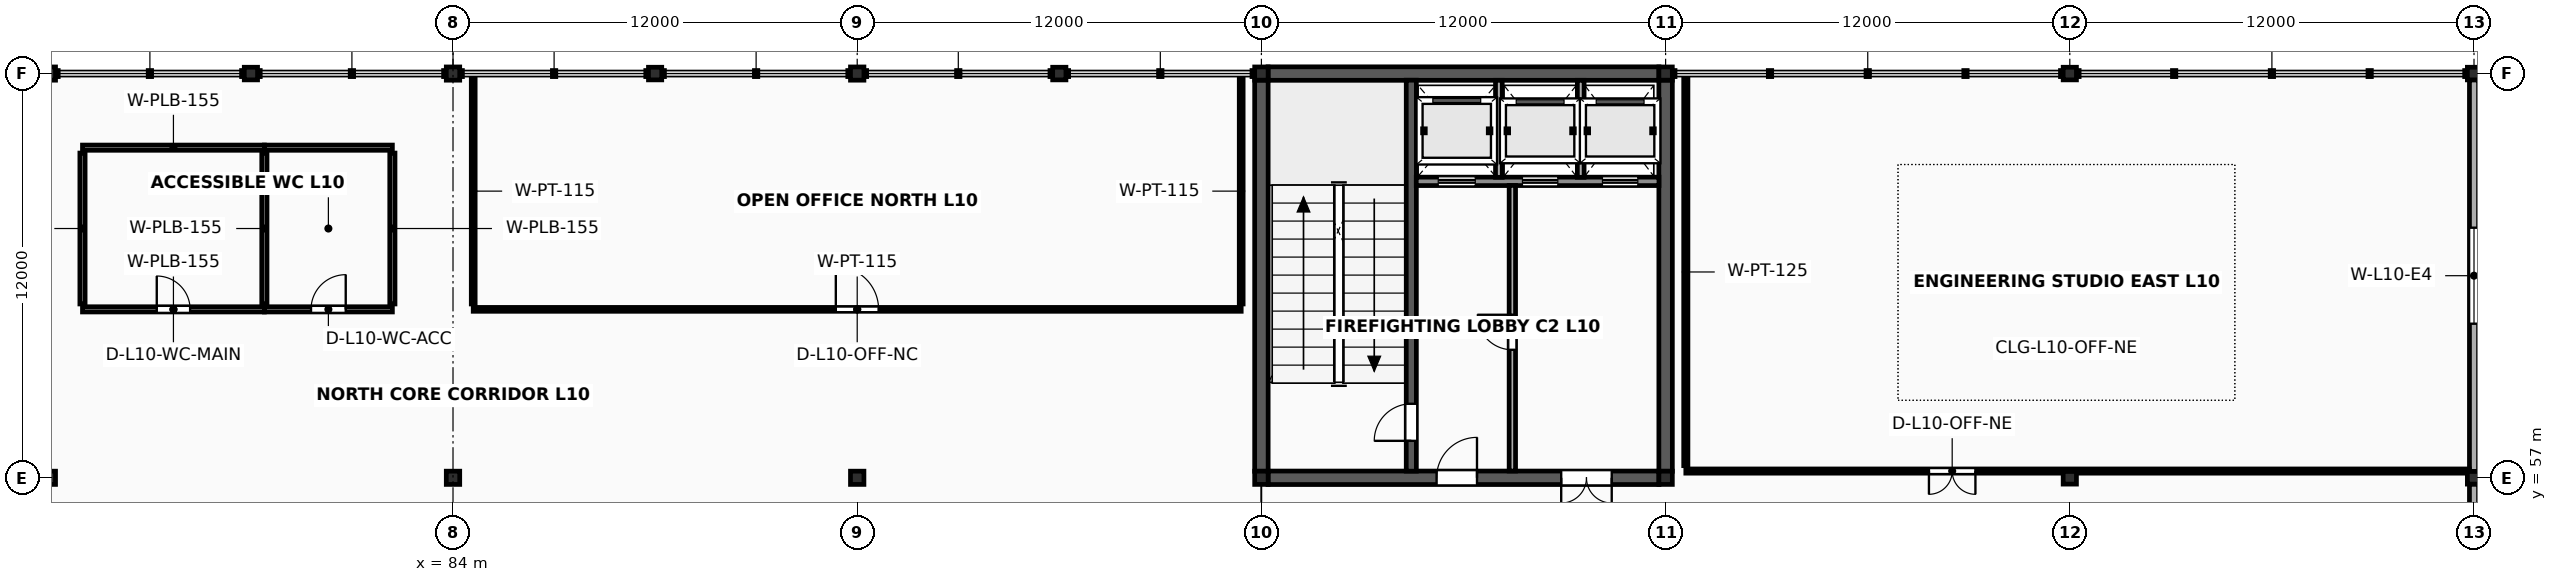
"""IFC4 building model, lengths in metres.
Left out: names, types, materials, properties, quantities, classifications, styles, units other than length and angle.
Written with IfcOpenShell. Run it as: python <this file> out.ifc"""

import sys

from ifc_helpers import new_model, si_unit, direction, frame, frame_2d, origin, origin_2d, place, context, subcontext, project, spatial, rectangle, i_section, extrude, element, fill, save


model = new_model("IFC4")
c1 = context("Model", 3, precision=1e-05, world=origin(), true_north=direction((0.0, 1.0)))
c2 = subcontext(c1, "Body", "Model", "MODEL_VIEW")
j1 = project(units=[si_unit("LENGTHUNIT", "METRE"), si_unit("PLANEANGLEUNIT", "RADIAN")], contexts=[c1])
p1 = place(None, origin())
s1 = spatial("IfcSite", under=j1, at=p1, CompositionType="ELEMENT")
p2 = place(p1, origin())
s2 = spatial("IfcBuilding", under=s1, at=p2, CompositionType="ELEMENT")
p3 = place(p2, frame((0.0, 0.0, 41.6)))
s3 = spatial("IfcBuildingStorey", under=s2, at=p3, CompositionType="ELEMENT", Elevation=41.6)
for number, where, z_axis, x_axis in (
    (1, (72.0, 57.0, 0.0), (0.0, 0.0, 1.0), (1.0, 0.0, 0.0)),
    (2, (72.0, 69.0, 0.0), (0.0, 0.0, 1.0), (1.0, 0.0, 0.0)),
    (3, (84.0, 57.0, 0.0), (0.0, 0.0, 1.0), (1.0, 0.0, 0.0)),
    (4, (84.0, 69.0, 0.0), (0.0, 0.0, 1.0), (1.0, 0.0, 0.0)),
    (5, (96.0, 57.0, 0.0), (0.0, 0.0, 1.0), (1.0, 0.0, 0.0)),
    (6, (96.0, 69.0, 0.0), (0.0, 0.0, 1.0), (1.0, 0.0, 0.0)),
    (7, (108.0, 57.0, 0.0), (0.0, 0.0, 1.0), (1.0, 0.0, 0.0)),
    (8, (108.0, 69.0, 0.0), (0.0, 0.0, 1.0), (1.0, 0.0, 0.0)),
    (9, (120.0, 57.0, 0.0), (0.0, 0.0, 1.0), (1.0, 0.0, 0.0)),
    (10, (120.0, 69.0, 0.0), (0.0, 0.0, 1.0), (1.0, 0.0, 0.0)),
):
    element("IfcColumn", number, at=place(p3, frame(where, z_axis=z_axis, x_axis=x_axis)), inside=s3, PredefinedType="COLUMN", context=c2, shape_type="SweptSolid", body=[
        extrude(i_section(OverallWidth=0.399, OverallDepth=0.393, WebThickness=0.023, FlangeThickness=0.037, FilletRadius=0.018, at=origin_2d()), origin(), (0.0, 0.0, 1.0), 4.0),
    ])
for number, where, z_axis, x_axis in (
    (11, (132.0, 57.0, 0.0), (0.0, 0.0, 1.0), (1.0, 0.0, 0.0)),
    (12, (132.0, 69.0, 0.0), (0.0, 0.0, 1.0), (1.0, 0.0, 0.0)),
    (13, (144.0, 57.0, 0.0), (0.0, 0.0, 1.0), (1.0, 0.0, 0.0)),
    (14, (144.0, 69.0, 0.0), (0.0, 0.0, 1.0), (1.0, 0.0, 0.0)),
    (15, (78.0, 69.0, 0.0), (0.0, 0.0, 1.0), (1.0, 0.0, 0.0)),
    (16, (90.0, 69.0, 0.0), (0.0, 0.0, 1.0), (1.0, 0.0, 0.0)),
    (17, (102.0, 69.0, 0.0), (0.0, 0.0, 1.0), (1.0, 0.0, 0.0)),
):
    element("IfcColumn", number, at=place(p3, frame(where, z_axis=z_axis, x_axis=x_axis)), inside=s3, PredefinedType="COLUMN", context=c2, shape_type="SweptSolid", body=[
        extrude(i_section(OverallWidth=0.394, OverallDepth=0.375, WebThickness=0.017, FlangeThickness=0.028, FilletRadius=0.018, at=origin_2d()), origin(), (0.0, 0.0, 1.0), 4.0),
    ])
p4 = place(p3, frame((108.197, 57.0, 0.0), z_axis=(0.0, 0.0, 1.0), x_axis=(1.0, 0.0, 0.0)))
e18 = element("IfcWall", 18, at=p4, inside=s3, PredefinedType="SHEAR", context=c2, shape_type="SweptSolid", body=[
    extrude(rectangle(XDim=11.607, YDim=0.4, at=frame_2d((5.803, 0.0))), origin(), (0.0, 0.0, 1.0), 3.828),
])
p5 = place(p4, frame((5.004, 0.0, 0.0)))
e19 = element("IfcOpeningElement", 19, at=p5, cuts=e18, PredefinedType="OPENING", context=c2, shape_type="SweptSolid", body=[
    extrude(rectangle(XDim=1.2, YDim=2.2, at=frame_2d((0.6, 1.1))), frame((0.0, 0.215, 0.0), z_axis=(0.0, -1.0, 0.0), x_axis=(1.0, 0.0, 0.0)), (0.0, 0.0, 1.0), 0.43),
])
p6 = place(p4, frame((8.704, 0.0, 0.0)))
e20 = element("IfcOpeningElement", 20, at=p6, cuts=e18, PredefinedType="OPENING", context=c2, shape_type="SweptSolid", body=[
    extrude(rectangle(XDim=1.5, YDim=2.25, at=frame_2d((0.75, 1.125))), frame((0.0, 0.215, 0.0), z_axis=(0.0, -1.0, 0.0), x_axis=(1.0, 0.0, 0.0)), (0.0, 0.0, 1.0), 0.43),
])
p7 = place(p3, frame((108.197, 69.0, 0.0), z_axis=(0.0, 0.0, 1.0), x_axis=(1.0, 0.0, 0.0)))
e21 = element("IfcWall", 21, at=p7, inside=s3, PredefinedType="SHEAR", context=c2, shape_type="SweptSolid", body=[
    extrude(rectangle(XDim=11.607, YDim=0.4, at=frame_2d((5.803, 0.0))), origin(), (0.0, 0.0, 1.0), 3.828),
])
for number, where, z_axis, x_axis in (
    (22, (108.0, 57.194, 0.0), (0.0, 0.0, 1.0), (0.0, 1.0, 0.0)),
    (23, (120.0, 57.194, 0.0), (0.0, 0.0, 1.0), (0.0, 1.0, 0.0)),
):
    element("IfcWall", number, at=place(p3, frame(where, z_axis=z_axis, x_axis=x_axis)), inside=s3, PredefinedType="SHEAR", context=c2, shape_type="SweptSolid", body=[
        extrude(rectangle(XDim=11.613, YDim=0.4, at=frame_2d((5.806, 0.0))), origin(), (0.0, 0.0, 1.0), 3.828),
    ])
p8 = place(p3, frame((112.45, 57.197, 0.0), z_axis=(0.0, 0.0, 1.0), x_axis=(0.0, 1.0, 0.0)))
e24 = element("IfcWall", 24, at=p8, inside=s3, PredefinedType="SHEAR", context=c2, shape_type="SweptSolid", body=[
    extrude(rectangle(XDim=11.606, YDim=0.3, at=frame_2d((5.803, 0.0))), origin(), (0.0, 0.0, 1.0), 3.828),
])
p9 = place(p8, frame((0.9, 0.0, 0.0)))
e25 = element("IfcOpeningElement", 25, at=p9, cuts=e24, PredefinedType="OPENING", context=c2, shape_type="SweptSolid", body=[
    extrude(rectangle(XDim=1.1, YDim=2.2, at=frame_2d((0.55, 1.1))), frame((0.0, 0.165, 0.0), z_axis=(0.0, -1.0, 0.0), x_axis=(1.0, 0.0, 0.0)), (0.0, 0.0, 1.0), 0.33),
])
p10 = place(p3, frame((112.597, 65.8, 0.0), z_axis=(0.0, 0.0, 1.0), x_axis=(1.0, 0.0, 0.0)))
e26 = element("IfcWall", 26, at=p10, inside=s3, PredefinedType="SOLIDWALL", context=c2, shape_type="SweptSolid", body=[
    extrude(rectangle(XDim=7.206, YDim=0.25, at=frame_2d((3.603, 0.0))), origin(), (0.0, 0.0, 1.0), 3.828),
])
p11 = place(p10, frame((0.653, 0.0, 0.0)))
e27 = element("IfcOpeningElement", 27, at=p11, cuts=e26, PredefinedType="OPENING", context=c2, shape_type="SweptSolid", body=[
    extrude(rectangle(XDim=1.1, YDim=2.24, at=frame_2d((0.55, 1.12))), frame((0.0, 0.14, 0.0), z_axis=(0.0, -1.0, 0.0), x_axis=(1.0, 0.0, 0.0)), (0.0, 0.0, 1.0), 0.28),
])
p12 = place(p10, frame((3.153, 0.0, 0.0)))
e28 = element("IfcOpeningElement", 28, at=p12, cuts=e26, PredefinedType="OPENING", context=c2, shape_type="SweptSolid", body=[
    extrude(rectangle(XDim=1.05, YDim=2.2, at=frame_2d((0.525, 1.1))), frame((0.0, 0.14, 0.0), z_axis=(0.0, -1.0, 0.0), x_axis=(1.0, 0.0, 0.0)), (0.0, 0.0, 1.0), 0.28),
])
p13 = place(p10, frame((5.528, 0.0, 0.0)))
e29 = element("IfcOpeningElement", 29, at=p13, cuts=e26, PredefinedType="OPENING", context=c2, shape_type="SweptSolid", body=[
    extrude(rectangle(XDim=1.05, YDim=2.2, at=frame_2d((0.525, 1.1))), frame((0.0, 0.14, 0.0), z_axis=(0.0, -1.0, 0.0), x_axis=(1.0, 0.0, 0.0)), (0.0, 0.0, 1.0), 0.28),
])
for number, where, z_axis, x_axis in (
    (30, (115.05, 65.92, 0.0), (0.0, 0.0, 1.0), (0.0, 1.0, 0.0)),
    (31, (117.48, 65.92, 0.0), (0.0, 0.0, 1.0), (0.0, 1.0, 0.0)),
):
    element("IfcWall", number, at=place(p3, frame(where, z_axis=z_axis, x_axis=x_axis)), inside=s3, PredefinedType="SOLIDWALL", context=c2, shape_type="SweptSolid", body=[
        extrude(rectangle(XDim=2.88, YDim=0.2, at=frame_2d((1.44, 0.0))), origin(), (0.0, 0.0, 1.0), 3.818),
    ])
p14 = place(p3, frame((115.45, 57.2, 0.0), z_axis=(0.0, 0.0, 1.0), x_axis=(0.0, 1.0, 0.0)))
e32 = element("IfcWall", 32, at=p14, inside=s3, PredefinedType="SOLIDWALL", context=c2, shape_type="SweptSolid", body=[
    extrude(rectangle(XDim=8.48, YDim=0.19, at=frame_2d((4.24, 0.0))), origin(), (0.0, 0.0, 1.0), 3.818),
])
p15 = place(p14, frame((3.6, 0.0, 0.0)))
e33 = element("IfcOpeningElement", 33, at=p15, cuts=e32, PredefinedType="OPENING", context=c2, shape_type="SweptSolid", body=[
    extrude(rectangle(XDim=1.04, YDim=2.18, at=frame_2d((0.52, 1.09))), frame((0.0, 0.11, 0.0), z_axis=(0.0, -1.0, 0.0), x_axis=(1.0, 0.0, 0.0)), (0.0, 0.0, 1.0), 0.22),
])
p16 = place(p3, frame((144.0, 45.186, 0.0), z_axis=(0.0, 0.0, 1.0), x_axis=(0.0, 1.0, 0.0)))
e34 = element("IfcWall", 34, at=p16, inside=s3, PredefinedType="SOLIDWALL", context=c2, shape_type="SweptSolid", body=[
    extrude(rectangle(XDim=11.629, YDim=0.27, at=frame_2d((5.814, 0.0))), origin(), (0.0, 0.0, 1.0), 3.281),
])
p17 = place(p16, frame((4.54, 0.0, 1.4)))
e35 = element("IfcOpeningElement", 35, at=p17, cuts=e34, PredefinedType="OPENING", context=c2, shape_type="SweptSolid", body=[
    extrude(rectangle(XDim=2.55, YDim=0.88, at=frame_2d((1.275, 0.44))), frame((0.0, 0.15, 0.0), z_axis=(0.0, -1.0, 0.0), x_axis=(1.0, 0.0, 0.0)), (0.0, 0.0, 1.0), 0.3),
])
p18 = place(p3, frame((144.0, 57.186, 0.0), z_axis=(0.0, 0.0, 1.0), x_axis=(0.0, 1.0, 0.0)))
e36 = element("IfcWall", 36, at=p18, inside=s3, PredefinedType="SOLIDWALL", context=c2, shape_type="SweptSolid", body=[
    extrude(rectangle(XDim=11.629, YDim=0.27, at=frame_2d((5.814, 0.0))), origin(), (0.0, 0.0, 1.0), 3.281),
])
p19 = place(p18, frame((4.389, 0.0, 1.4)))
e37 = element("IfcOpeningElement", 37, at=p19, cuts=e36, PredefinedType="OPENING", context=c2, shape_type="SweptSolid", body=[
    extrude(rectangle(XDim=2.85, YDim=0.88, at=frame_2d((1.425, 0.44))), frame((0.0, 0.15, 0.0), z_axis=(0.0, -1.0, 0.0), x_axis=(1.0, 0.0, 0.0)), (0.0, 0.0, 1.0), 0.3),
])
p20 = place(p3, frame((73.0, 62.0, 0.0), z_axis=(0.0, 0.0, 1.0), x_axis=(1.0, 0.0, 0.0)))
e38 = element("IfcWall", 38, at=p20, inside=s3, PredefinedType="PLUMBINGWALL", context=c2, shape_type="SweptSolid", body=[
    extrude(rectangle(XDim=5.4, YDim=0.155, at=frame_2d((2.7, 0.0))), origin(), (0.0, 0.0, 1.0), 2.88),
])
p21 = place(p20, frame((2.205, 0.0, 0.0)))
e39 = element("IfcOpeningElement", 39, at=p21, cuts=e38, PredefinedType="OPENING", context=c2, shape_type="SweptSolid", body=[
    extrude(rectangle(XDim=0.99, YDim=2.15, at=frame_2d((0.495, 1.075))), frame((0.0, 0.093, 0.0), z_axis=(0.0, -1.0, 0.0), x_axis=(1.0, 0.0, 0.0)), (0.0, 0.0, 1.0), 0.185),
])
p22 = place(p3, frame((73.0, 66.8, 0.0), z_axis=(0.0, 0.0, 1.0), x_axis=(1.0, 0.0, 0.0)))
e40 = element("IfcWall", 40, at=p22, inside=s3, PredefinedType="PLUMBINGWALL", context=c2, shape_type="SweptSolid", body=[
    extrude(rectangle(XDim=5.4, YDim=0.155, at=frame_2d((2.7, 0.0))), origin(), (0.0, 0.0, 1.0), 2.88),
])
for number, where, z_axis, x_axis in (
    (41, (73.0, 62.16, 0.0), (0.0, 0.0, 1.0), (0.0, 1.0, 0.0)),
    (42, (78.4, 62.16, 0.0), (0.0, 0.0, 1.0), (0.0, 1.0, 0.0)),
):
    element("IfcWall", number, at=place(p3, frame(where, z_axis=z_axis, x_axis=x_axis)), inside=s3, PredefinedType="PLUMBINGWALL", context=c2, shape_type="SweptSolid", body=[
        extrude(rectangle(XDim=4.48, YDim=0.155, at=frame_2d((2.24, 0.0))), origin(), (0.0, 0.0, 1.0), 2.88),
    ])
p23 = place(p3, frame((78.4, 62.0, 0.0), z_axis=(0.0, 0.0, 1.0), x_axis=(1.0, 0.0, 0.0)))
e43 = element("IfcWall", 43, at=p23, inside=s3, PredefinedType="PLUMBINGWALL", context=c2, shape_type="SweptSolid", body=[
    extrude(rectangle(XDim=3.8, YDim=0.155, at=frame_2d((1.9, 0.0))), origin(), (0.0, 0.0, 1.0), 2.88),
])
p24 = place(p23, frame((1.385, 0.0, 0.0)))
e44 = element("IfcOpeningElement", 44, at=p24, cuts=e43, PredefinedType="OPENING", context=c2, shape_type="SweptSolid", body=[
    extrude(rectangle(XDim=1.03, YDim=2.17, at=frame_2d((0.515, 1.085))), frame((0.0, 0.093, 0.0), z_axis=(0.0, -1.0, 0.0), x_axis=(1.0, 0.0, 0.0)), (0.0, 0.0, 1.0), 0.185),
])
p25 = place(p3, frame((78.4, 66.8, 0.0), z_axis=(0.0, 0.0, 1.0), x_axis=(1.0, 0.0, 0.0)))
e45 = element("IfcWall", 45, at=p25, inside=s3, PredefinedType="PLUMBINGWALL", context=c2, shape_type="SweptSolid", body=[
    extrude(rectangle(XDim=3.8, YDim=0.155, at=frame_2d((1.9, 0.0))), origin(), (0.0, 0.0, 1.0), 2.88),
])
p26 = place(p3, frame((82.2, 62.16, 0.0), z_axis=(0.0, 0.0, 1.0), x_axis=(0.0, 1.0, 0.0)))
e46 = element("IfcWall", 46, at=p26, inside=s3, PredefinedType="PLUMBINGWALL", context=c2, shape_type="SweptSolid", body=[
    extrude(rectangle(XDim=4.48, YDim=0.155, at=frame_2d((2.24, 0.0))), origin(), (0.0, 0.0, 1.0), 2.88),
])
p27 = place(p3, frame((84.6, 62.0, 0.0), z_axis=(0.0, 0.0, 1.0), x_axis=(1.0, 0.0, 0.0)))
e47 = element("IfcWall", 47, at=p27, inside=s3, PredefinedType="PARTITIONING", context=c2, shape_type="SweptSolid", body=[
    extrude(rectangle(XDim=22.8, YDim=0.115, at=frame_2d((11.4, 0.0))), origin(), (0.0, 0.0, 1.0), 2.88),
])
p28 = place(p27, frame((10.765, 0.0, 0.0)))
e48 = element("IfcOpeningElement", 48, at=p28, cuts=e47, PredefinedType="OPENING", context=c2, shape_type="SweptSolid", body=[
    extrude(rectangle(XDim=1.27, YDim=2.27, at=frame_2d((0.635, 1.135))), frame((0.0, 0.073, 0.0), z_axis=(0.0, -1.0, 0.0), x_axis=(1.0, 0.0, 0.0)), (0.0, 0.0, 1.0), 0.145),
])
for number, where, z_axis, x_axis in (
    (49, (84.6, 62.16, 0.0), (0.0, 0.0, 1.0), (0.0, 1.0, 0.0)),
    (50, (107.4, 62.16, 0.0), (0.0, 0.0, 1.0), (0.0, 1.0, 0.0)),
):
    element("IfcWall", number, at=place(p3, frame(where, z_axis=z_axis, x_axis=x_axis)), inside=s3, PredefinedType="PARTITIONING", context=c2, shape_type="SweptSolid", body=[
        extrude(rectangle(XDim=6.7, YDim=0.115, at=frame_2d((3.35, 0.0))), origin(), (0.0, 0.0, 1.0), 2.88),
    ])
p29 = place(p3, frame((120.6, 57.2, 0.0), z_axis=(0.0, 0.0, 1.0), x_axis=(1.0, 0.0, 0.0)))
e51 = element("IfcWall", 51, at=p29, inside=s3, PredefinedType="PARTITIONING", context=c2, shape_type="SweptSolid", body=[
    extrude(rectangle(XDim=23.26, YDim=0.125, at=frame_2d((11.63, 0.0))), origin(), (0.0, 0.0, 1.0), 2.88),
])
p30 = place(p29, frame((7.218, 0.0, 0.0)))
e52 = element("IfcOpeningElement", 52, at=p30, cuts=e51, PredefinedType="OPENING", context=c2, shape_type="SweptSolid", body=[
    extrude(rectangle(XDim=1.38, YDim=2.23, at=frame_2d((0.69, 1.115))), frame((0.0, 0.077, 0.0), z_axis=(0.0, -1.0, 0.0), x_axis=(1.0, 0.0, 0.0)), (0.0, 0.0, 1.0), 0.155),
])
p31 = place(p3, frame((120.6, 57.36, 0.0), z_axis=(0.0, 0.0, 1.0), x_axis=(0.0, 1.0, 0.0)))
e53 = element("IfcWall", 53, at=p31, inside=s3, PredefinedType="PARTITIONING", context=c2, shape_type="SweptSolid", body=[
    extrude(rectangle(XDim=11.5, YDim=0.125, at=frame_2d((5.75, 0.0))), origin(), (0.0, 0.0, 1.0), 2.88),
])
p32 = place(p19, origin())
e54 = element("IfcWindow", 54, at=p32, inside=s3, PartitioningType="DOUBLE_PANEL_VERTICAL", PredefinedType="USERDEFINED", context=c2, shape_type="SweptSolid", body=[
    extrude(rectangle(XDim=2.85, YDim=0.88, at=frame_2d((1.425, 0.44))), frame((0.0, 0.03, 0.0), z_axis=(0.0, -1.0, 0.0), x_axis=(1.0, 0.0, 0.0)), (0.0, 0.0, 1.0), 0.06),
])
fill(e37, e54)
p33 = place(p9, origin())
e55 = element("IfcDoor", 55, at=p33, inside=s3, OperationType="SINGLE_SWING_LEFT", PredefinedType="DOOR", context=c2, shape_type="SweptSolid", body=[
    extrude(rectangle(XDim=1.1, YDim=2.2, at=frame_2d((0.55, 1.1))), frame((0.0, 0.025, 0.0), z_axis=(0.0, -1.0, 0.0), x_axis=(1.0, 0.0, 0.0)), (0.0, 0.0, 1.0), 0.05),
])
fill(e25, e55)
p34 = place(p15, origin())
e56 = element("IfcDoor", 56, at=p34, inside=s3, OperationType="SINGLE_SWING_RIGHT", PredefinedType="DOOR", context=c2, shape_type="SweptSolid", body=[
    extrude(rectangle(XDim=1.04, YDim=2.18, at=frame_2d((0.52, 1.09))), frame((0.0, 0.025, 0.0), z_axis=(0.0, -1.0, 0.0), x_axis=(1.0, 0.0, 0.0)), (0.0, 0.0, 1.0), 0.05),
])
fill(e33, e56)
p35 = place(p5, origin())
e57 = element("IfcDoor", 57, at=p35, inside=s3, OperationType="SINGLE_SWING_RIGHT", PredefinedType="DOOR", context=c2, shape_type="SweptSolid", body=[
    extrude(rectangle(XDim=1.2, YDim=2.2, at=frame_2d((0.6, 1.1))), frame((0.0, 0.025, 0.0), z_axis=(0.0, -1.0, 0.0), x_axis=(1.0, 0.0, 0.0)), (0.0, 0.0, 1.0), 0.05),
])
fill(e19, e57)
p36 = place(p6, origin())
e58 = element("IfcDoor", 58, at=p36, inside=s3, OperationType="DOUBLE_DOOR_SINGLE_SWING", PredefinedType="DOOR", context=c2, shape_type="SweptSolid", body=[
    extrude(rectangle(XDim=1.5, YDim=2.25, at=frame_2d((0.75, 1.125))), frame((0.0, 0.025, 0.0), z_axis=(0.0, -1.0, 0.0), x_axis=(1.0, 0.0, 0.0)), (0.0, 0.0, 1.0), 0.05),
])
fill(e20, e58)
p37 = place(p11, origin())
e59 = element("IfcDoor", 59, at=p37, inside=s3, OperationType="SLIDING_TO_LEFT", PredefinedType="USERDEFINED", context=c2, shape_type="SweptSolid", body=[
    extrude(rectangle(XDim=1.1, YDim=2.24, at=frame_2d((0.55, 1.12))), frame((0.0, 0.025, 0.0), z_axis=(0.0, -1.0, 0.0), x_axis=(1.0, 0.0, 0.0)), (0.0, 0.0, 1.0), 0.05),
])
fill(e27, e59)
p38 = place(p12, origin())
e60 = element("IfcDoor", 60, at=p38, inside=s3, OperationType="SLIDING_TO_LEFT", PredefinedType="USERDEFINED", context=c2, shape_type="SweptSolid", body=[
    extrude(rectangle(XDim=1.05, YDim=2.2, at=frame_2d((0.525, 1.1))), frame((0.0, 0.025, 0.0), z_axis=(0.0, -1.0, 0.0), x_axis=(1.0, 0.0, 0.0)), (0.0, 0.0, 1.0), 0.05),
])
fill(e28, e60)
p39 = place(p13, origin())
e61 = element("IfcDoor", 61, at=p39, inside=s3, OperationType="SLIDING_TO_LEFT", PredefinedType="USERDEFINED", context=c2, shape_type="SweptSolid", body=[
    extrude(rectangle(XDim=1.05, YDim=2.2, at=frame_2d((0.525, 1.1))), frame((0.0, 0.025, 0.0), z_axis=(0.0, -1.0, 0.0), x_axis=(1.0, 0.0, 0.0)), (0.0, 0.0, 1.0), 0.05),
])
fill(e29, e61)
p40 = place(p21, origin())
e62 = element("IfcDoor", 62, at=p40, inside=s3, OperationType="SINGLE_SWING_LEFT", PredefinedType="DOOR", context=c2, shape_type="SweptSolid", body=[
    extrude(rectangle(XDim=0.99, YDim=2.15, at=frame_2d((0.495, 1.075))), frame((0.0, 0.025, 0.0), z_axis=(0.0, -1.0, 0.0), x_axis=(1.0, 0.0, 0.0)), (0.0, 0.0, 1.0), 0.05),
])
fill(e39, e62)
p41 = place(p24, origin())
e63 = element("IfcDoor", 63, at=p41, inside=s3, OperationType="SINGLE_SWING_RIGHT", PredefinedType="DOOR", context=c2, shape_type="SweptSolid", body=[
    extrude(rectangle(XDim=1.03, YDim=2.17, at=frame_2d((0.515, 1.085))), frame((0.0, 0.025, 0.0), z_axis=(0.0, -1.0, 0.0), x_axis=(1.0, 0.0, 0.0)), (0.0, 0.0, 1.0), 0.05),
])
fill(e44, e63)
p42 = place(p28, origin())
e64 = element("IfcDoor", 64, at=p42, inside=s3, OperationType="SINGLE_SWING_LEFT", PredefinedType="DOOR", context=c2, shape_type="SweptSolid", body=[
    extrude(rectangle(XDim=1.27, YDim=2.27, at=frame_2d((0.635, 1.135))), frame((0.0, 0.025, 0.0), z_axis=(0.0, -1.0, 0.0), x_axis=(1.0, 0.0, 0.0)), (0.0, 0.0, 1.0), 0.05),
])
fill(e48, e64)
p43 = place(p30, origin())
e65 = element("IfcDoor", 65, at=p43, inside=s3, OperationType="DOUBLE_DOOR_SINGLE_SWING", PredefinedType="DOOR", context=c2, shape_type="SweptSolid", body=[
    extrude(rectangle(XDim=1.38, YDim=2.23, at=frame_2d((0.69, 1.115))), frame((0.0, 0.025, 0.0), z_axis=(0.0, -1.0, 0.0), x_axis=(1.0, 0.0, 0.0)), (0.0, 0.0, 1.0), 0.05),
])
fill(e52, e65)
save(model, sys.argv[1])
